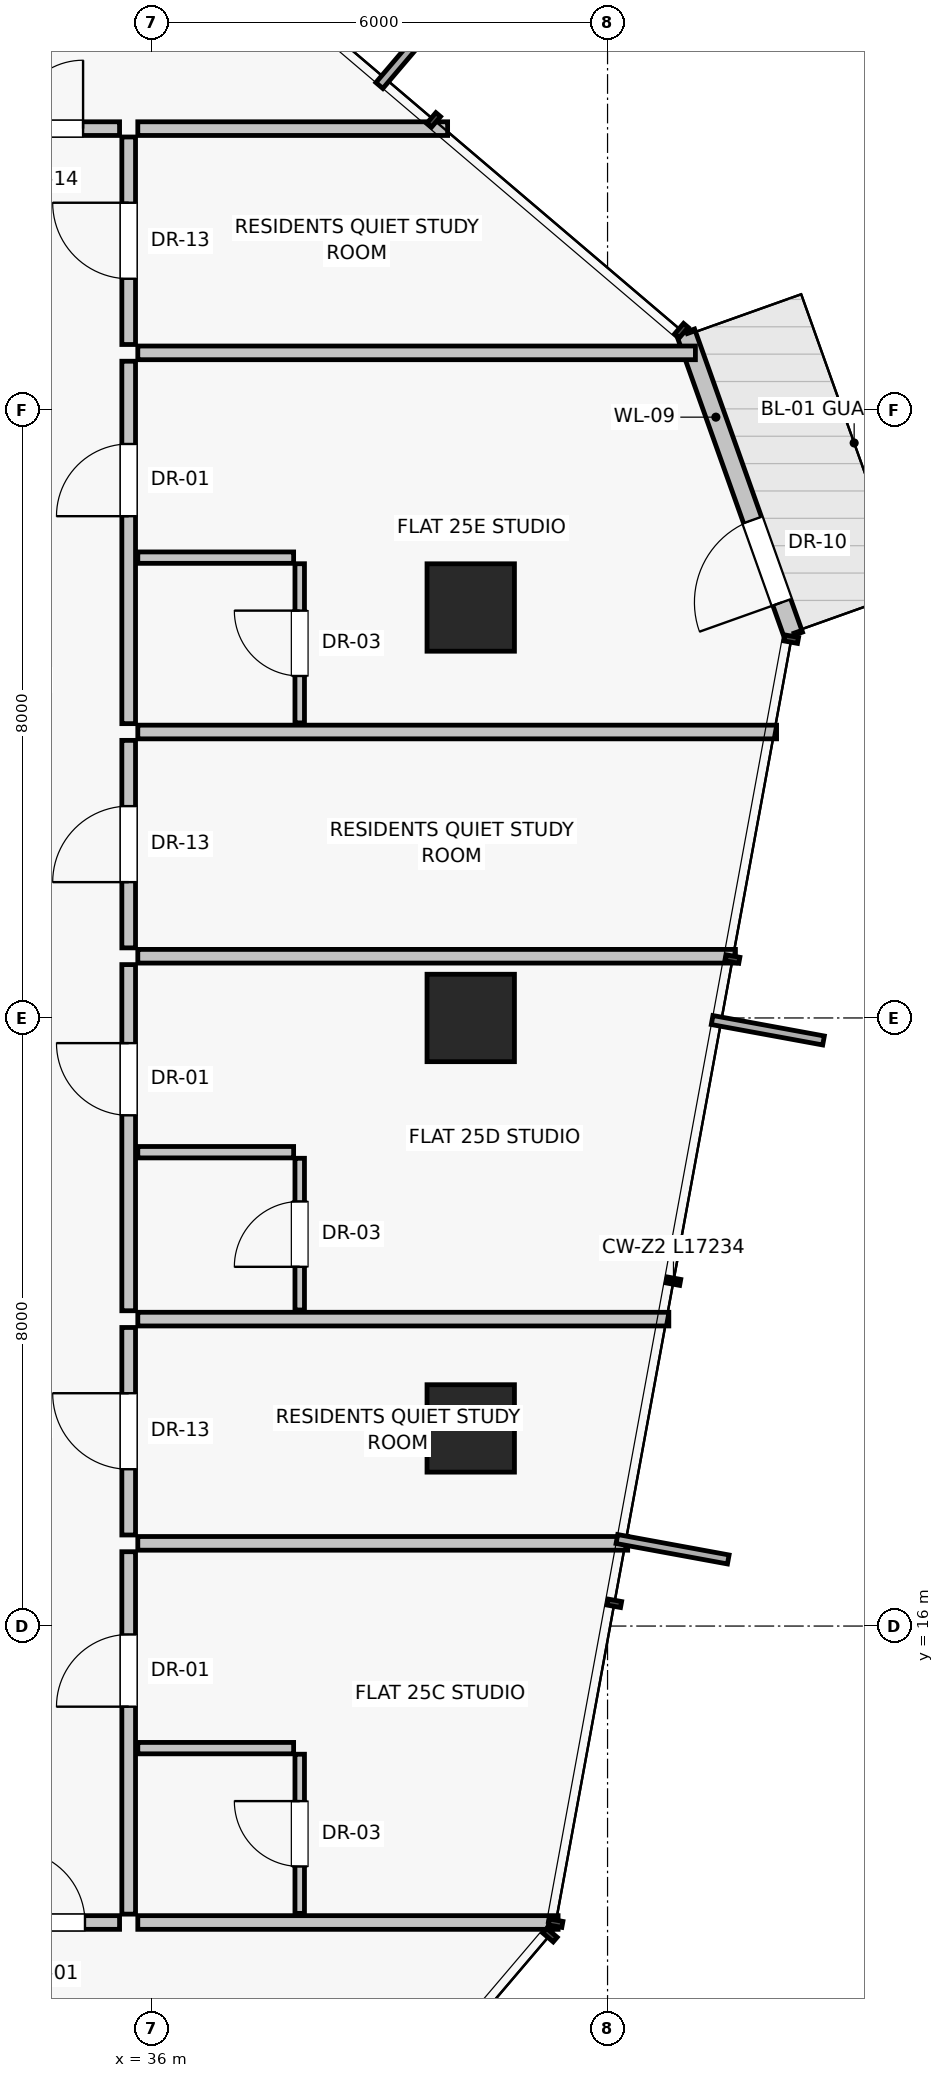
"""IFC4 building model, lengths in metres.
Left out: names, types, materials, properties, quantities, classifications, styles, units other than length and angle.
Written with IfcOpenShell. Run it as: python <this file> out.ifc"""

import sys

from ifc_helpers import new_model, si_unit, direction, frame, frame_2d, origin, origin_2d, place, context, subcontext, project, spatial, rectangle, extrude, source, transform, mapped, element, fill, save


model = new_model("IFC4")
c1 = context("Model", 3, precision=1e-05, world=origin(), true_north=direction((0.0, 1.0)))
c2 = subcontext(c1, "Body", "Model", "MODEL_VIEW")
j1 = project(units=[si_unit("LENGTHUNIT", "METRE"), si_unit("PLANEANGLEUNIT", "RADIAN")], contexts=[c1])
p1 = place(None, origin())
s1 = spatial("IfcSite", under=j1, at=p1, CompositionType="ELEMENT")
p2 = place(p1, origin())
s2 = spatial("IfcBuilding", under=s1, at=p2, CompositionType="ELEMENT")
p3 = place(p2, frame((0.0, 0.0, 92.7)))
s3 = spatial("IfcBuildingStorey", under=s2, at=p3, CompositionType="ELEMENT", Elevation=92.7)
for number, where, z_axis, x_axis in (
    (1, (40.2, 18.6, 0.0), (0.0, 0.0, 1.0), (1.0, 0.0, 0.0)),
    (2, (40.2, 24.0, 0.0), (0.0, 0.0, 1.0), (1.0, 0.0, 0.0)),
    (3, (40.2, 29.4, 0.0), (0.0, 0.0, 1.0), (1.0, 0.0, 0.0)),
):
    element("IfcColumn", number, at=place(p3, frame(where, z_axis=z_axis, x_axis=x_axis)), inside=s3, PredefinedType="COLUMN", context=c2, shape_type="SweptSolid", body=[
        extrude(rectangle(XDim=1.15, YDim=1.15, at=origin_2d()), origin(), (0.0, 0.0, 1.0), 3.25),
    ])
p4 = place(p3, frame((44.447, 29.034, 0.0), z_axis=(0.0, 0.0, 1.0), x_axis=(-0.335437454249, 0.942062478972, 0.0)))
e4 = element("IfcWall", 4, at=p4, inside=s3, PredefinedType="SOLIDWALL", context=c2, shape_type="SweptSolid", body=[
    extrude(rectangle(XDim=4.233, YDim=0.25, at=frame_2d((2.117, 0.0))), origin(), (0.0, 0.0, 1.0), 3.0),
])
p5 = place(p4, frame((0.46, 0.0, 0.0)))
e5 = element("IfcOpeningElement", 5, at=p5, cuts=e4, PredefinedType="OPENING", context=c2, shape_type="SweptSolid", body=[
    extrude(rectangle(XDim=1.15, YDim=2.25, at=frame_2d((0.575, 1.125))), frame((0.0, 0.135, 0.0), z_axis=(0.0, -1.0, 0.0), x_axis=(1.0, 0.0, 0.0)), (0.0, 0.0, 1.0), 0.27),
])
p6 = place(p3, frame((35.82, 12.1, 0.0), z_axis=(0.0, 0.0, 1.0), x_axis=(1.0, 0.0, 0.0)))
e6 = element("IfcWall", 6, at=p6, inside=s3, PredefinedType="PARTITIONING", context=c2, shape_type="SweptSolid", body=[
    extrude(rectangle(XDim=5.529, YDim=0.18, at=frame_2d((2.765, 0.0))), origin(), (0.0, 0.0, 1.0), 3.0),
])
p7 = place(p3, frame((35.82, 35.7, 0.0), z_axis=(0.0, 0.0, 1.0), x_axis=(1.0, 0.0, 0.0)))
e7 = element("IfcWall", 7, at=p7, inside=s3, PredefinedType="PARTITIONING", context=c2, shape_type="SweptSolid", body=[
    extrude(rectangle(XDim=4.076, YDim=0.18, at=frame_2d((2.038, 0.0))), origin(), (0.0, 0.0, 1.0), 3.0),
])
p8 = place(p3, frame((35.7, 17.198, 0.0), z_axis=(0.0, 0.0, 1.0), x_axis=(0.0, 1.0, 0.0)))
e8 = element("IfcWall", 8, at=p8, inside=s3, PredefinedType="PARTITIONING", context=c2, shape_type="SweptSolid", body=[
    extrude(rectangle(XDim=2.73, YDim=0.18, at=frame_2d((1.365, 0.0))), origin(), (0.0, 0.0, 1.0), 2.58),
])
p9 = place(p8, frame((0.865, 0.0, 0.0)))
e9 = element("IfcOpeningElement", 9, at=p9, cuts=e8, PredefinedType="OPENING", context=c2, shape_type="SweptSolid", body=[
    extrude(rectangle(XDim=1.0, YDim=2.01, at=frame_2d((0.5, 1.005))), frame((0.0, 0.1, 0.0), z_axis=(0.0, -1.0, 0.0), x_axis=(1.0, 0.0, 0.0)), (0.0, 0.0, 1.0), 0.2),
])
p10 = place(p3, frame((35.82, 17.088, 0.0), z_axis=(0.0, 0.0, 1.0), x_axis=(1.0, 0.0, 0.0)))
e10 = element("IfcWall", 10, at=p10, inside=s3, PredefinedType="PARTITIONING", context=c2, shape_type="SweptSolid", body=[
    extrude(rectangle(XDim=6.445, YDim=0.18, at=frame_2d((3.222, 0.0))), origin(), (0.0, 0.0, 1.0), 3.0),
])
p11 = place(p3, frame((35.7, 12.21, 0.0), z_axis=(0.0, 0.0, 1.0), x_axis=(0.0, 1.0, 0.0)))
e11 = element("IfcWall", 11, at=p11, inside=s3, PredefinedType="PARTITIONING", context=c2, shape_type="SweptSolid", body=[
    extrude(rectangle(XDim=4.768, YDim=0.18, at=frame_2d((2.384, 0.0))), origin(), (0.0, 0.0, 1.0), 3.0),
])
p12 = place(p11, frame((2.729, 0.0, 0.0)))
e12 = element("IfcOpeningElement", 12, at=p12, cuts=e11, PredefinedType="OPENING", context=c2, shape_type="SweptSolid", body=[
    extrude(rectangle(XDim=0.95, YDim=2.02, at=frame_2d((0.475, 1.01))), frame((0.0, 0.1, 0.0), z_axis=(0.0, -1.0, 0.0), x_axis=(1.0, 0.0, 0.0)), (0.0, 0.0, 1.0), 0.2),
])
p13 = place(p3, frame((35.82, 14.394, 0.0), z_axis=(0.0, 0.0, 1.0), x_axis=(1.0, 0.0, 0.0)))
e13 = element("IfcWall", 13, at=p13, inside=s3, PredefinedType="PARTITIONING", context=c2, shape_type="SweptSolid", body=[
    extrude(rectangle(XDim=2.05, YDim=0.15, at=frame_2d((1.025, 0.0))), origin(), (0.0, 0.0, 1.0), 3.0),
])
p14 = place(p3, frame((37.95, 12.22, 0.0), z_axis=(0.0, 0.0, 1.0), x_axis=(0.0, 1.0, 0.0)))
e14 = element("IfcWall", 14, at=p14, inside=s3, PredefinedType="PARTITIONING", context=c2, shape_type="SweptSolid", body=[
    extrude(rectangle(XDim=2.094, YDim=0.125, at=frame_2d((1.047, 0.0))), origin(), (0.0, 0.0, 1.0), 3.0),
])
p15 = place(p14, frame((0.617, 0.0, 0.0)))
e15 = element("IfcOpeningElement", 15, at=p15, cuts=e14, PredefinedType="OPENING", context=c2, shape_type="SweptSolid", body=[
    extrude(rectangle(XDim=0.86, YDim=2.01, at=frame_2d((0.43, 1.005))), frame((0.0, 0.073, 0.0), z_axis=(0.0, -1.0, 0.0), x_axis=(1.0, 0.0, 0.0)), (0.0, 0.0, 1.0), 0.145),
])
p16 = place(p3, frame((35.82, 20.038, 0.0), z_axis=(0.0, 0.0, 1.0), x_axis=(1.0, 0.0, 0.0)))
e16 = element("IfcWall", 16, at=p16, inside=s3, PredefinedType="PARTITIONING", context=c2, shape_type="SweptSolid", body=[
    extrude(rectangle(XDim=6.986, YDim=0.18, at=frame_2d((3.493, 0.0))), origin(), (0.0, 0.0, 1.0), 3.0),
])
p17 = place(p3, frame((35.7, 24.922, 0.0), z_axis=(0.0, 0.0, 1.0), x_axis=(0.0, 1.0, 0.0)))
e17 = element("IfcWall", 17, at=p17, inside=s3, PredefinedType="PARTITIONING", context=c2, shape_type="SweptSolid", body=[
    extrude(rectangle(XDim=2.73, YDim=0.18, at=frame_2d((1.365, 0.0))), origin(), (0.0, 0.0, 1.0), 2.58),
])
p18 = place(p17, frame((0.865, 0.0, 0.0)))
e18 = element("IfcOpeningElement", 18, at=p18, cuts=e17, PredefinedType="OPENING", context=c2, shape_type="SweptSolid", body=[
    extrude(rectangle(XDim=1.0, YDim=2.01, at=frame_2d((0.5, 1.005))), frame((0.0, 0.1, 0.0), z_axis=(0.0, -1.0, 0.0), x_axis=(1.0, 0.0, 0.0)), (0.0, 0.0, 1.0), 0.2),
])
p19 = place(p3, frame((35.82, 24.812, 0.0), z_axis=(0.0, 0.0, 1.0), x_axis=(1.0, 0.0, 0.0)))
e19 = element("IfcWall", 19, at=p19, inside=s3, PredefinedType="PARTITIONING", context=c2, shape_type="SweptSolid", body=[
    extrude(rectangle(XDim=7.862, YDim=0.18, at=frame_2d((3.931, 0.0))), origin(), (0.0, 0.0, 1.0), 3.0),
])
p20 = place(p3, frame((35.7, 20.148, 0.0), z_axis=(0.0, 0.0, 1.0), x_axis=(0.0, 1.0, 0.0)))
e20 = element("IfcWall", 20, at=p20, inside=s3, PredefinedType="PARTITIONING", context=c2, shape_type="SweptSolid", body=[
    extrude(rectangle(XDim=4.554, YDim=0.18, at=frame_2d((2.277, 0.0))), origin(), (0.0, 0.0, 1.0), 2.58),
])
p21 = place(p20, frame((2.571, 0.0, 0.0)))
e21 = element("IfcOpeningElement", 21, at=p21, cuts=e20, PredefinedType="OPENING", context=c2, shape_type="SweptSolid", body=[
    extrude(rectangle(XDim=0.95, YDim=2.02, at=frame_2d((0.475, 1.01))), frame((0.0, 0.1, 0.0), z_axis=(0.0, -1.0, 0.0), x_axis=(1.0, 0.0, 0.0)), (0.0, 0.0, 1.0), 0.2),
])
p22 = place(p3, frame((35.82, 22.234, 0.0), z_axis=(0.0, 0.0, 1.0), x_axis=(1.0, 0.0, 0.0)))
e22 = element("IfcWall", 22, at=p22, inside=s3, PredefinedType="PARTITIONING", context=c2, shape_type="SweptSolid", body=[
    extrude(rectangle(XDim=2.05, YDim=0.15, at=frame_2d((1.025, 0.0))), origin(), (0.0, 0.0, 1.0), 3.0),
])
p23 = place(p3, frame((37.95, 20.158, 0.0), z_axis=(0.0, 0.0, 1.0), x_axis=(0.0, 1.0, 0.0)))
e23 = element("IfcWall", 23, at=p23, inside=s3, PredefinedType="PARTITIONING", context=c2, shape_type="SweptSolid", body=[
    extrude(rectangle(XDim=1.996, YDim=0.125, at=frame_2d((0.998, 0.0))), origin(), (0.0, 0.0, 1.0), 3.0),
])
p24 = place(p23, frame((0.568, 0.0, 0.0)))
e24 = element("IfcOpeningElement", 24, at=p24, cuts=e23, PredefinedType="OPENING", context=c2, shape_type="SweptSolid", body=[
    extrude(rectangle(XDim=0.86, YDim=2.01, at=frame_2d((0.43, 1.005))), frame((0.0, 0.073, 0.0), z_axis=(0.0, -1.0, 0.0), x_axis=(1.0, 0.0, 0.0)), (0.0, 0.0, 1.0), 0.145),
])
p25 = place(p3, frame((35.82, 27.762, 0.0), z_axis=(0.0, 0.0, 1.0), x_axis=(1.0, 0.0, 0.0)))
e25 = element("IfcWall", 25, at=p25, inside=s3, PredefinedType="PARTITIONING", context=c2, shape_type="SweptSolid", body=[
    extrude(rectangle(XDim=8.404, YDim=0.18, at=frame_2d((4.202, 0.0))), origin(), (0.0, 0.0, 1.0), 3.0),
])
p26 = place(p3, frame((35.7, 32.86, 0.0), z_axis=(0.0, 0.0, 1.0), x_axis=(0.0, 1.0, 0.0)))
e26 = element("IfcWall", 26, at=p26, inside=s3, PredefinedType="PARTITIONING", context=c2, shape_type="SweptSolid", body=[
    extrude(rectangle(XDim=2.73, YDim=0.18, at=frame_2d((1.365, 0.0))), origin(), (0.0, 0.0, 1.0), 3.0),
])
p27 = place(p26, frame((0.865, 0.0, 0.0)))
e27 = element("IfcOpeningElement", 27, at=p27, cuts=e26, PredefinedType="OPENING", context=c2, shape_type="SweptSolid", body=[
    extrude(rectangle(XDim=1.0, YDim=2.01, at=frame_2d((0.5, 1.005))), frame((0.0, 0.1, 0.0), z_axis=(0.0, -1.0, 0.0), x_axis=(1.0, 0.0, 0.0)), (0.0, 0.0, 1.0), 0.2),
])
p28 = place(p3, frame((35.82, 32.75, 0.0), z_axis=(0.0, 0.0, 1.0), x_axis=(1.0, 0.0, 0.0)))
e28 = element("IfcWall", 28, at=p28, inside=s3, PredefinedType="PARTITIONING", context=c2, shape_type="SweptSolid", body=[
    extrude(rectangle(XDim=7.336, YDim=0.18, at=frame_2d((3.668, 0.0))), origin(), (0.0, 0.0, 1.0), 3.0),
])
p29 = place(p3, frame((35.7, 27.872, 0.0), z_axis=(0.0, 0.0, 1.0), x_axis=(0.0, 1.0, 0.0)))
e29 = element("IfcWall", 29, at=p29, inside=s3, PredefinedType="PARTITIONING", context=c2, shape_type="SweptSolid", body=[
    extrude(rectangle(XDim=4.768, YDim=0.18, at=frame_2d((2.384, 0.0))), origin(), (0.0, 0.0, 1.0), 2.58),
])
p30 = place(p29, frame((2.729, 0.0, 0.0)))
e30 = element("IfcOpeningElement", 30, at=p30, cuts=e29, PredefinedType="OPENING", context=c2, shape_type="SweptSolid", body=[
    extrude(rectangle(XDim=0.95, YDim=2.02, at=frame_2d((0.475, 1.01))), frame((0.0, 0.1, 0.0), z_axis=(0.0, -1.0, 0.0), x_axis=(1.0, 0.0, 0.0)), (0.0, 0.0, 1.0), 0.2),
])
p31 = place(p3, frame((35.82, 30.056, 0.0), z_axis=(0.0, 0.0, 1.0), x_axis=(1.0, 0.0, 0.0)))
e31 = element("IfcWall", 31, at=p31, inside=s3, PredefinedType="PARTITIONING", context=c2, shape_type="SweptSolid", body=[
    extrude(rectangle(XDim=2.05, YDim=0.15, at=frame_2d((1.025, 0.0))), origin(), (0.0, 0.0, 1.0), 2.378),
])
p32 = place(p3, frame((37.95, 27.882, 0.0), z_axis=(0.0, 0.0, 1.0), x_axis=(0.0, 1.0, 0.0)))
e32 = element("IfcWall", 32, at=p32, inside=s3, PredefinedType="PARTITIONING", context=c2, shape_type="SweptSolid", body=[
    extrude(rectangle(XDim=2.094, YDim=0.125, at=frame_2d((1.047, 0.0))), origin(), (0.0, 0.0, 1.0), 3.0),
])
p33 = place(p32, frame((0.617, 0.0, 0.0)))
e33 = element("IfcOpeningElement", 33, at=p33, cuts=e32, PredefinedType="OPENING", context=c2, shape_type="SweptSolid", body=[
    extrude(rectangle(XDim=0.86, YDim=2.01, at=frame_2d((0.43, 1.005))), frame((0.0, 0.073, 0.0), z_axis=(0.0, -1.0, 0.0), x_axis=(1.0, 0.0, 0.0)), (0.0, 0.0, 1.0), 0.145),
])
p34 = place(p3, frame((33.72, 12.1, 0.0), z_axis=(0.0, 0.0, 1.0), x_axis=(1.0, 0.0, 0.0)))
e34 = element("IfcWall", 34, at=p34, inside=s3, PredefinedType="PARTITIONING", context=c2, shape_type="SweptSolid", body=[
    extrude(rectangle(XDim=1.86, YDim=0.18, at=frame_2d((0.93, 0.0))), origin(), (0.0, 0.0, 1.0), 3.0),
])
p35 = place(p34, frame((0.455, 0.0, 0.0)))
e35 = element("IfcOpeningElement", 35, at=p35, cuts=e34, PredefinedType="OPENING", context=c2, shape_type="SweptSolid", body=[
    extrude(rectangle(XDim=0.95, YDim=2.02, at=frame_2d((0.475, 1.01))), frame((0.0, 0.1, 0.0), z_axis=(0.0, -1.0, 0.0), x_axis=(1.0, 0.0, 0.0)), (0.0, 0.0, 1.0), 0.2),
])
p36 = place(p3, frame((33.72, 35.7, 0.0), z_axis=(0.0, 0.0, 1.0), x_axis=(1.0, 0.0, 0.0)))
e36 = element("IfcWall", 36, at=p36, inside=s3, PredefinedType="PARTITIONING", context=c2, shape_type="SweptSolid", body=[
    extrude(rectangle(XDim=1.86, YDim=0.18, at=frame_2d((0.93, 0.0))), origin(), (0.0, 0.0, 1.0), 3.0),
])
p37 = place(p36, frame((0.48, 0.0, 0.0)))
e37 = element("IfcOpeningElement", 37, at=p37, cuts=e36, PredefinedType="OPENING", context=c2, shape_type="SweptSolid", body=[
    extrude(rectangle(XDim=0.9, YDim=2.01, at=frame_2d((0.45, 1.005))), frame((0.0, 0.1, 0.0), z_axis=(0.0, -1.0, 0.0), x_axis=(1.0, 0.0, 0.0)), (0.0, 0.0, 1.0), 0.2),
])
m1 = source(origin(), c2, "Body", "SweptSolid", [
    extrude(rectangle(XDim=1.15, YDim=2.25, at=frame_2d((0.575, 1.125))), frame((0.0, 0.025, 0.0), z_axis=(0.0, -1.0, 0.0), x_axis=(1.0, 0.0, 0.0)), (0.0, 0.0, 1.0), 0.05),
])
p38 = place(p5, frame((1.15, 0.0, 0.0), z_axis=(0.0, 0.0, 1.0), x_axis=(-1.0, 0.0, 0.0)))
e38 = element("IfcDoor", 38, at=p38, inside=s3, OperationType="SINGLE_SWING_LEFT", PredefinedType="DOOR", context=c2, shape_type="MappedRepresentation", body=[
    mapped(m1, transform((0.0, 0.0, 0.0), scale=1.0)),
])
fill(e5, e38)
m2 = source(origin(), c2, "Body", "SweptSolid", [
    extrude(rectangle(XDim=1.0, YDim=2.01, at=frame_2d((0.5, 1.005))), frame((0.0, 0.025, 0.0), z_axis=(0.0, -1.0, 0.0), x_axis=(1.0, 0.0, 0.0)), (0.0, 0.0, 1.0), 0.05),
])
p39 = place(p9, origin())
e39 = element("IfcDoor", 39, at=p39, inside=s3, OperationType="SINGLE_SWING_RIGHT", PredefinedType="DOOR", context=c2, shape_type="MappedRepresentation", body=[
    mapped(m2, transform((0.0, 0.0, 0.0), scale=1.0)),
])
fill(e9, e39)
m3 = source(origin(), c2, "Body", "SweptSolid", [
    extrude(rectangle(XDim=0.95, YDim=2.02, at=frame_2d((0.475, 1.01))), frame((0.0, 0.025, 0.0), z_axis=(0.0, -1.0, 0.0), x_axis=(1.0, 0.0, 0.0)), (0.0, 0.0, 1.0), 0.05),
])
p40 = place(p12, origin())
e40 = element("IfcDoor", 40, at=p40, inside=s3, OperationType="SINGLE_SWING_LEFT", PredefinedType="DOOR", context=c2, shape_type="MappedRepresentation", body=[
    mapped(m3, transform((0.0, 0.0, 0.0), scale=1.0)),
])
fill(e12, e40)
m4 = source(origin(), c2, "Body", "SweptSolid", [
    extrude(rectangle(XDim=0.86, YDim=2.01, at=frame_2d((0.43, 1.005))), frame((0.0, 0.025, 0.0), z_axis=(0.0, -1.0, 0.0), x_axis=(1.0, 0.0, 0.0)), (0.0, 0.0, 1.0), 0.05),
])
p41 = place(p15, origin())
e41 = element("IfcDoor", 41, at=p41, inside=s3, OperationType="SINGLE_SWING_RIGHT", PredefinedType="DOOR", context=c2, shape_type="MappedRepresentation", body=[
    mapped(m4, transform((0.0, 0.0, 0.0), scale=1.0)),
])
fill(e15, e41)
p42 = place(p18, origin())
e42 = element("IfcDoor", 42, at=p42, inside=s3, OperationType="SINGLE_SWING_LEFT", PredefinedType="DOOR", context=c2, shape_type="MappedRepresentation", body=[
    mapped(m2, transform((0.0, 0.0, 0.0), scale=1.0)),
])
fill(e18, e42)
p43 = place(p21, origin())
e43 = element("IfcDoor", 43, at=p43, inside=s3, OperationType="SINGLE_SWING_RIGHT", PredefinedType="DOOR", context=c2, shape_type="MappedRepresentation", body=[
    mapped(m3, transform((0.0, 0.0, 0.0), scale=1.0)),
])
fill(e21, e43)
p44 = place(p24, origin())
e44 = element("IfcDoor", 44, at=p44, inside=s3, OperationType="SINGLE_SWING_LEFT", PredefinedType="DOOR", context=c2, shape_type="MappedRepresentation", body=[
    mapped(m4, transform((0.0, 0.0, 0.0), scale=1.0)),
])
fill(e24, e44)
p45 = place(p27, origin())
e45 = element("IfcDoor", 45, at=p45, inside=s3, OperationType="SINGLE_SWING_RIGHT", PredefinedType="DOOR", context=c2, shape_type="MappedRepresentation", body=[
    mapped(m2, transform((0.0, 0.0, 0.0), scale=1.0)),
])
fill(e27, e45)
p46 = place(p30, origin())
e46 = element("IfcDoor", 46, at=p46, inside=s3, OperationType="SINGLE_SWING_LEFT", PredefinedType="DOOR", context=c2, shape_type="MappedRepresentation", body=[
    mapped(m3, transform((0.0, 0.0, 0.0), scale=1.0)),
])
fill(e30, e46)
p47 = place(p33, origin())
e47 = element("IfcDoor", 47, at=p47, inside=s3, OperationType="SINGLE_SWING_RIGHT", PredefinedType="DOOR", context=c2, shape_type="MappedRepresentation", body=[
    mapped(m4, transform((0.0, 0.0, 0.0), scale=1.0)),
])
fill(e33, e47)
p48 = place(p35, origin())
e48 = element("IfcDoor", 48, at=p48, inside=s3, OperationType="SINGLE_SWING_LEFT", PredefinedType="DOOR", context=c2, shape_type="MappedRepresentation", body=[
    mapped(m3, transform((0.0, 0.0, 0.0), scale=1.0)),
])
fill(e35, e48)
m5 = source(origin(), c2, "Body", "SweptSolid", [
    extrude(rectangle(XDim=0.9, YDim=2.01, at=frame_2d((0.45, 1.005))), frame((0.0, 0.025, 0.0), z_axis=(0.0, -1.0, 0.0), x_axis=(1.0, 0.0, 0.0)), (0.0, 0.0, 1.0), 0.05),
])
p49 = place(p37, origin())
e49 = element("IfcDoor", 49, at=p49, inside=s3, OperationType="SINGLE_SWING_RIGHT", PredefinedType="DOOR", context=c2, shape_type="MappedRepresentation", body=[
    mapped(m5, transform((0.0, 0.0, 0.0), scale=1.0)),
])
fill(e37, e49)
save(model, sys.argv[1])
